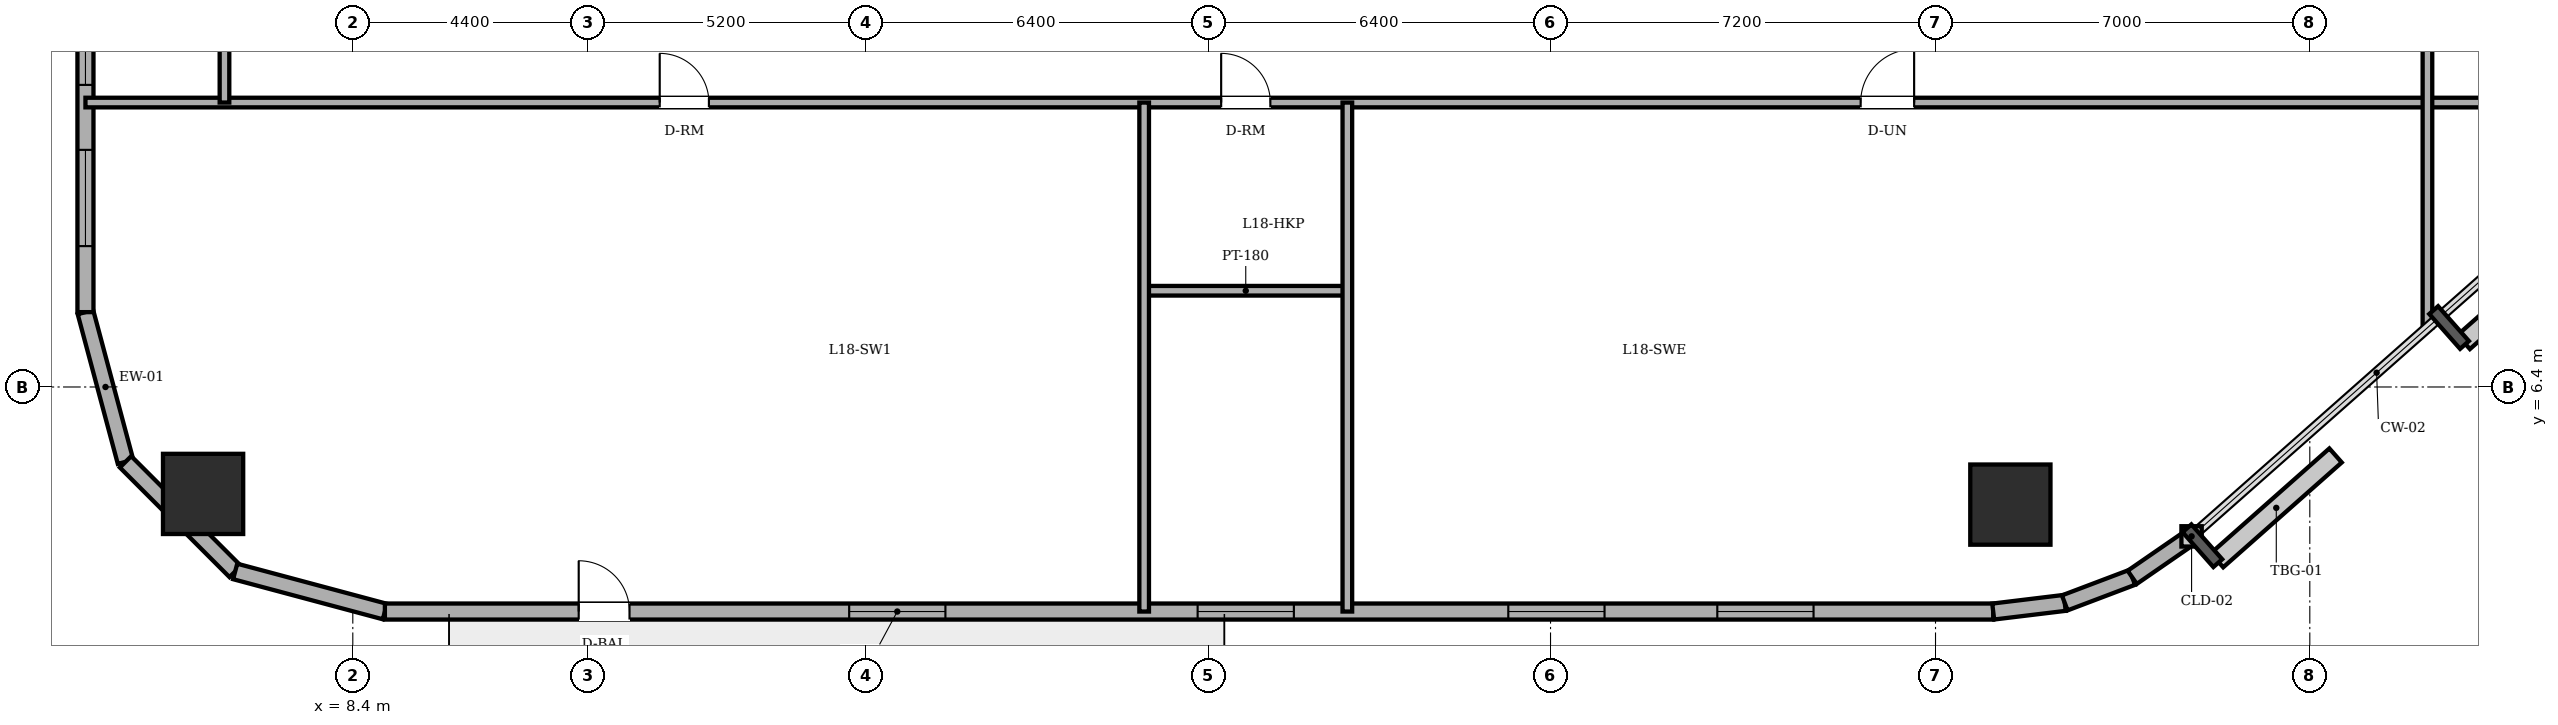
"""IFC4 building model, lengths in metres.
Left out: names, types, materials, properties, quantities, classifications, styles, units other than length and angle.
Written with IfcOpenShell. Run it as: python <this file> out.ifc"""

import sys

from ifc_helpers import new_model, si_unit, direction, frame, frame_2d, origin, origin_2d, place, context, subcontext, project, spatial, rectangle, circle, extrude, element, fill, save


model = new_model("IFC4")
c1 = context("Model", 3, precision=1e-05, world=origin(), true_north=direction((0.0, 1.0)))
c2 = subcontext(c1, "Body", "Model", "MODEL_VIEW")
j1 = project(units=[si_unit("LENGTHUNIT", "METRE"), si_unit("PLANEANGLEUNIT", "RADIAN")], contexts=[c1])
p1 = place(None, origin())
s1 = spatial("IfcSite", under=j1, at=p1, CompositionType="ELEMENT")
p2 = place(p1, origin())
s2 = spatial("IfcBuilding", under=s1, at=p2, CompositionType="ELEMENT")
p3 = place(p2, frame((0.0, 0.0, 68.4)))
s3 = spatial("IfcBuildingStorey", under=s2, at=p3, CompositionType="ELEMENT", Elevation=68.4)
for number, where, z_axis, x_axis in (
    (1, (5.6, 4.4, 0.0), (0.0, 0.0, 1.0), (1.0, 0.0, 0.0)),
    (2, (39.4, 4.2, 0.0), (0.0, 0.0, 1.0), (1.0, 0.0, 0.0)),
):
    element("IfcColumn", number, at=place(p3, frame(where, z_axis=z_axis, x_axis=x_axis)), inside=s3, PredefinedType="COLUMN", context=c2, shape_type="SweptSolid", body=[
        extrude(circle(Radius=0.75, at=origin_2d()), origin(), (0.0, 0.0, 1.0), 3.6),
    ])
p4 = place(p3, frame((3.4, 7.8, 0.0), z_axis=(0.0, 0.0, 1.0), x_axis=(0.258731875344, -0.96594917914, 0.0)))
e3 = element("IfcWall", 3, at=p4, inside=s3, PredefinedType="SOLIDWALL", context=c2, shape_type="SweptSolid", body=[
    extrude(rectangle(XDim=2.899, YDim=0.3, at=frame_2d((1.449, 0.0))), origin(), (0.0, 0.0, 1.0), 3.4),
])
p5 = place(p3, frame((4.15, 5.0, 0.0), z_axis=(0.0, 0.0, 1.0), x_axis=(0.707106781187, -0.707106781187, 0.0)))
e4 = element("IfcWall", 4, at=p5, inside=s3, PredefinedType="SOLIDWALL", context=c2, shape_type="SweptSolid", body=[
    extrude(rectangle(XDim=2.899, YDim=0.3, at=frame_2d((1.45, 0.0))), origin(), (0.0, 0.0, 1.0), 3.4),
])
p6 = place(p3, frame((6.2, 2.95, 0.0), z_axis=(0.0, 0.0, 1.0), x_axis=(0.96594917914, -0.258731875344, 0.0)))
e5 = element("IfcWall", 5, at=p6, inside=s3, PredefinedType="SOLIDWALL", context=c2, shape_type="SweptSolid", body=[
    extrude(rectangle(XDim=2.899, YDim=0.3, at=frame_2d((1.449, 0.0))), origin(), (0.0, 0.0, 1.0), 3.4),
])
p7 = place(p3, frame((9.0, 2.2, 0.0), z_axis=(0.0, 0.0, 1.0), x_axis=(1.0, 0.0, 0.0)))
e6 = element("IfcWall", 6, at=p7, inside=s3, PredefinedType="SOLIDWALL", context=c2, shape_type="SweptSolid", body=[
    extrude(rectangle(XDim=30.079, YDim=0.3, at=frame_2d((15.04, 0.0))), origin(), (0.0, 0.0, 1.0), 3.4),
])
p8 = place(p7, frame((3.625, 0.0, 0.0)))
e7 = element("IfcOpeningElement", 7, at=p8, cuts=e6, PredefinedType="OPENING", context=c2, shape_type="SweptSolid", body=[
    extrude(rectangle(XDim=0.95, YDim=2.2, at=frame_2d((0.475, 1.1))), frame((0.0, 0.16, 0.0), z_axis=(0.0, -1.0, 0.0), x_axis=(1.0, 0.0, 0.0)), (0.0, 0.0, 1.0), 0.32),
])
p9 = place(p7, frame((8.683, 0.0, 0.85)))
e8 = element("IfcOpeningElement", 8, at=p9, cuts=e6, PredefinedType="OPENING", context=c2, shape_type="SweptSolid", body=[
    extrude(rectangle(XDim=1.8, YDim=1.55, at=frame_2d((0.9, 0.775))), frame((0.0, 0.16, 0.0), z_axis=(0.0, -1.0, 0.0), x_axis=(1.0, 0.0, 0.0)), (0.0, 0.0, 1.0), 0.32),
])
p10 = place(p7, frame((15.2, 0.0, 0.85)))
e9 = element("IfcOpeningElement", 9, at=p10, cuts=e6, PredefinedType="OPENING", context=c2, shape_type="SweptSolid", body=[
    extrude(rectangle(XDim=1.8, YDim=1.55, at=frame_2d((0.9, 0.775))), frame((0.0, 0.16, 0.0), z_axis=(0.0, -1.0, 0.0), x_axis=(1.0, 0.0, 0.0)), (0.0, 0.0, 1.0), 0.32),
])
p11 = place(p7, frame((21.01, 0.0, 0.85)))
e10 = element("IfcOpeningElement", 10, at=p11, cuts=e6, PredefinedType="OPENING", context=c2, shape_type="SweptSolid", body=[
    extrude(rectangle(XDim=1.8, YDim=1.55, at=frame_2d((0.9, 0.775))), frame((0.0, 0.16, 0.0), z_axis=(0.0, -1.0, 0.0), x_axis=(1.0, 0.0, 0.0)), (0.0, 0.0, 1.0), 0.32),
])
p12 = place(p7, frame((24.919, 0.0, 0.85)))
e11 = element("IfcOpeningElement", 11, at=p12, cuts=e6, PredefinedType="OPENING", context=c2, shape_type="SweptSolid", body=[
    extrude(rectangle(XDim=1.8, YDim=1.55, at=frame_2d((0.9, 0.775))), frame((0.0, 0.16, 0.0), z_axis=(0.0, -1.0, 0.0), x_axis=(1.0, 0.0, 0.0)), (0.0, 0.0, 1.0), 0.32),
])
p13 = place(p3, frame((39.079, 2.2, 0.0), z_axis=(0.0, 0.0, 1.0), x_axis=(0.992739027259, 0.120288086515, 0.0)))
e12 = element("IfcWall", 12, at=p13, inside=s3, PredefinedType="SOLIDWALL", context=c2, shape_type="SweptSolid", body=[
    extrude(rectangle(XDim=1.348, YDim=0.3, at=frame_2d((0.674, 0.0))), origin(), (0.0, 0.0, 1.0), 3.4),
])
p14 = place(p3, frame((40.417, 2.362, 0.0), z_axis=(0.0, 0.0, 1.0), x_axis=(0.935156721165, 0.354234254216, 0.0)))
e13 = element("IfcWall", 13, at=p14, inside=s3, PredefinedType="SOLIDWALL", context=c2, shape_type="SweptSolid", body=[
    extrude(rectangle(XDim=1.349, YDim=0.3, at=frame_2d((0.675, 0.0))), origin(), (0.0, 0.0, 1.0), 3.4),
])
p15 = place(p3, frame((41.679, 2.84, 0.0), z_axis=(0.0, 0.0, 1.0), x_axis=(0.823116500192, 0.567872544777, 0.0)))
e14 = element("IfcWall", 14, at=p15, inside=s3, PredefinedType="SOLIDWALL", context=c2, shape_type="SweptSolid", body=[
    extrude(rectangle(XDim=1.349, YDim=0.3, at=frame_2d((0.674, 0.0))), origin(), (0.0, 0.0, 1.0), 3.4),
])
p16 = place(p3, frame((3.4, 40.2, 0.0), z_axis=(0.0, 0.0, 1.0), x_axis=(0.0, -1.0, 0.0)))
e15 = element("IfcWall", 15, at=p16, inside=s3, PredefinedType="SOLIDWALL", context=c2, shape_type="SweptSolid", body=[
    extrude(rectangle(XDim=32.4, YDim=0.3, at=frame_2d((16.2, 0.0))), origin(), (0.0, 0.0, 1.0), 3.4),
])
p17 = place(p16, frame((1.235, 0.0, 0.85)))
e16 = element("IfcOpeningElement", 16, at=p17, cuts=e15, PredefinedType="OPENING", context=c2, shape_type="SweptSolid", body=[
    extrude(rectangle(XDim=1.8, YDim=1.55, at=frame_2d((0.9, 0.775))), frame((0.0, 0.16, 0.0), z_axis=(0.0, -1.0, 0.0), x_axis=(1.0, 0.0, 0.0)), (0.0, 0.0, 1.0), 0.32),
])
p18 = place(p16, frame((4.25, 0.0, 0.85)))
e17 = element("IfcOpeningElement", 17, at=p18, cuts=e15, PredefinedType="OPENING", context=c2, shape_type="SweptSolid", body=[
    extrude(rectangle(XDim=1.8, YDim=1.55, at=frame_2d((0.9, 0.775))), frame((0.0, 0.16, 0.0), z_axis=(0.0, -1.0, 0.0), x_axis=(1.0, 0.0, 0.0)), (0.0, 0.0, 1.0), 0.32),
])
p19 = place(p16, frame((9.253, 0.0, 0.85)))
e18 = element("IfcOpeningElement", 18, at=p19, cuts=e15, PredefinedType="OPENING", context=c2, shape_type="SweptSolid", body=[
    extrude(rectangle(XDim=1.8, YDim=1.55, at=frame_2d((0.9, 0.775))), frame((0.0, 0.16, 0.0), z_axis=(0.0, -1.0, 0.0), x_axis=(1.0, 0.0, 0.0)), (0.0, 0.0, 1.0), 0.32),
])
p20 = place(p16, frame((13.027, 0.0, 0.85)))
e19 = element("IfcOpeningElement", 19, at=p20, cuts=e15, PredefinedType="OPENING", context=c2, shape_type="SweptSolid", body=[
    extrude(rectangle(XDim=1.8, YDim=1.55, at=frame_2d((0.9, 0.775))), frame((0.0, 0.16, 0.0), z_axis=(0.0, -1.0, 0.0), x_axis=(1.0, 0.0, 0.0)), (0.0, 0.0, 1.0), 0.32),
])
p21 = place(p16, frame((19.573, 0.0, 0.85)))
e20 = element("IfcOpeningElement", 20, at=p21, cuts=e15, PredefinedType="OPENING", context=c2, shape_type="SweptSolid", body=[
    extrude(rectangle(XDim=1.8, YDim=1.55, at=frame_2d((0.9, 0.775))), frame((0.0, 0.16, 0.0), z_axis=(0.0, -1.0, 0.0), x_axis=(1.0, 0.0, 0.0)), (0.0, 0.0, 1.0), 0.32),
])
p22 = place(p16, frame((22.347, 0.0, 0.85)))
e21 = element("IfcOpeningElement", 21, at=p22, cuts=e15, PredefinedType="OPENING", context=c2, shape_type="SweptSolid", body=[
    extrude(rectangle(XDim=1.8, YDim=1.55, at=frame_2d((0.9, 0.775))), frame((0.0, 0.16, 0.0), z_axis=(0.0, -1.0, 0.0), x_axis=(1.0, 0.0, 0.0)), (0.0, 0.0, 1.0), 0.32),
])
p23 = place(p16, frame((26.35, 0.0, 0.85)))
e22 = element("IfcOpeningElement", 22, at=p23, cuts=e15, PredefinedType="OPENING", context=c2, shape_type="SweptSolid", body=[
    extrude(rectangle(XDim=1.8, YDim=1.55, at=frame_2d((0.9, 0.775))), frame((0.0, 0.16, 0.0), z_axis=(0.0, -1.0, 0.0), x_axis=(1.0, 0.0, 0.0)), (0.0, 0.0, 1.0), 0.32),
])
p24 = place(p16, frame((29.365, 0.0, 0.85)))
e23 = element("IfcOpeningElement", 23, at=p24, cuts=e15, PredefinedType="OPENING", context=c2, shape_type="SweptSolid", body=[
    extrude(rectangle(XDim=1.8, YDim=1.55, at=frame_2d((0.9, 0.775))), frame((0.0, 0.16, 0.0), z_axis=(0.0, -1.0, 0.0), x_axis=(1.0, 0.0, 0.0)), (0.0, 0.0, 1.0), 0.32),
])
p25 = place(p3, frame((23.2, 8.2, 0.0), z_axis=(0.0, 0.0, 1.0), x_axis=(1.0, 0.0, 0.0)))
e24 = element("IfcWall", 24, at=p25, inside=s3, PredefinedType="PARTITIONING", context=c2, shape_type="SweptSolid", body=[
    extrude(rectangle(XDim=3.8, YDim=0.18, at=frame_2d((1.9, 0.0))), origin(), (0.0, 0.0, 1.0), 3.4),
])
p26 = place(p3, frame((3.4, 11.72, 0.0), z_axis=(0.0, 0.0, 1.0), x_axis=(1.0, 0.0, 0.0)))
e25 = element("IfcWall", 25, at=p26, inside=s3, PredefinedType="PARTITIONING", context=c2, shape_type="SweptSolid", body=[
    extrude(rectangle(XDim=47.689, YDim=0.18, at=frame_2d((23.845, 0.0))), origin(), (0.0, 0.0, 1.0), 3.4),
])
p27 = place(p26, frame((21.24, 0.0, 0.0)))
e26 = element("IfcOpeningElement", 26, at=p27, cuts=e25, PredefinedType="OPENING", context=c2, shape_type="SweptSolid", body=[
    extrude(rectangle(XDim=0.92, YDim=2.1, at=frame_2d((0.46, 1.05))), frame((0.0, 0.1, 0.0), z_axis=(0.0, -1.0, 0.0), x_axis=(1.0, 0.0, 0.0)), (0.0, 0.0, 1.0), 0.2),
])
p28 = place(p26, frame((10.74, 0.0, 0.0)))
e27 = element("IfcOpeningElement", 27, at=p28, cuts=e25, PredefinedType="OPENING", context=c2, shape_type="SweptSolid", body=[
    extrude(rectangle(XDim=0.92, YDim=2.1, at=frame_2d((0.46, 1.05))), frame((0.0, 0.1, 0.0), z_axis=(0.0, -1.0, 0.0), x_axis=(1.0, 0.0, 0.0)), (0.0, 0.0, 1.0), 0.2),
])
p29 = place(p26, frame((33.2, 0.0, 0.0)))
e28 = element("IfcOpeningElement", 28, at=p29, cuts=e25, PredefinedType="OPENING", context=c2, shape_type="SweptSolid", body=[
    extrude(rectangle(XDim=1.0, YDim=2.15, at=frame_2d((0.5, 1.075))), frame((0.0, 0.1, 0.0), z_axis=(0.0, -1.0, 0.0), x_axis=(1.0, 0.0, 0.0)), (0.0, 0.0, 1.0), 0.2),
])
p30 = place(p3, frame((6.0, 11.72, 0.0), z_axis=(0.0, 0.0, 1.0), x_axis=(0.0, 1.0, 0.0)))
e29 = element("IfcWall", 29, at=p30, inside=s3, PredefinedType="PARTITIONING", context=c2, shape_type="SweptSolid", body=[
    extrude(rectangle(XDim=2.46, YDim=0.18, at=frame_2d((1.23, 0.0))), origin(), (0.0, 0.0, 1.0), 3.4),
])
for number, where, z_axis, x_axis in (
    (30, (23.2, 2.2, 0.0), (0.0, 0.0, 1.0), (0.0, 1.0, 0.0)),
    (31, (27.0, 2.2, 0.0), (0.0, 0.0, 1.0), (0.0, 1.0, 0.0)),
):
    element("IfcWall", number, at=place(p3, frame(where, z_axis=z_axis, x_axis=x_axis)), inside=s3, PredefinedType="PARTITIONING", context=c2, shape_type="SweptSolid", body=[
        extrude(rectangle(XDim=9.52, YDim=0.18, at=frame_2d((4.76, 0.0))), origin(), (0.0, 0.0, 1.0), 3.4),
    ])
p31 = place(p3, frame((47.2, 7.508, 0.0), z_axis=(0.0, 0.0, 1.0), x_axis=(0.0, 1.0, 0.0)))
e32 = element("IfcWall", 32, at=p31, inside=s3, PredefinedType="PARTITIONING", context=c2, shape_type="SweptSolid", body=[
    extrude(rectangle(XDim=22.842, YDim=0.18, at=frame_2d((11.421, 0.0))), origin(), (0.0, 0.0, 1.0), 3.4),
])
p32 = place(p31, frame((18.447, 0.0, 0.0)))
e33 = element("IfcOpeningElement", 33, at=p32, cuts=e32, PredefinedType="OPENING", context=c2, shape_type="SweptSolid", body=[
    extrude(rectangle(XDim=0.92, YDim=2.1, at=frame_2d((0.46, 1.05))), frame((0.0, 0.1, 0.0), z_axis=(0.0, -1.0, 0.0), x_axis=(1.0, 0.0, 0.0)), (0.0, 0.0, 1.0), 0.2),
])
p33 = place(p31, frame((11.524, 0.0, 0.0)))
e34 = element("IfcOpeningElement", 34, at=p33, cuts=e32, PredefinedType="OPENING", context=c2, shape_type="SweptSolid", body=[
    extrude(rectangle(XDim=0.92, YDim=2.1, at=frame_2d((0.46, 1.05))), frame((0.0, 0.1, 0.0), z_axis=(0.0, -1.0, 0.0), x_axis=(1.0, 0.0, 0.0)), (0.0, 0.0, 1.0), 0.2),
])
p34 = place(p8, origin())
e35 = element("IfcDoor", 35, at=p34, inside=s3, OperationType="SINGLE_SWING_LEFT", PredefinedType="DOOR", context=c2, shape_type="SweptSolid", body=[
    extrude(rectangle(XDim=0.95, YDim=2.2, at=frame_2d((0.475, 1.1))), frame((0.0, 0.025, 0.0), z_axis=(0.0, -1.0, 0.0), x_axis=(1.0, 0.0, 0.0)), (0.0, 0.0, 1.0), 0.05),
])
fill(e7, e35)
p35 = place(p9, origin())
e36 = element("IfcWindow", 36, at=p35, inside=s3, PartitioningType="DOUBLE_PANEL_VERTICAL", PredefinedType="WINDOW", context=c2, shape_type="SweptSolid", body=[
    extrude(rectangle(XDim=1.8, YDim=1.55, at=frame_2d((0.9, 0.775))), frame((0.0, 0.03, 0.0), z_axis=(0.0, -1.0, 0.0), x_axis=(1.0, 0.0, 0.0)), (0.0, 0.0, 1.0), 0.06),
])
fill(e8, e36)
p36 = place(p10, origin())
e37 = element("IfcWindow", 37, at=p36, inside=s3, PartitioningType="DOUBLE_PANEL_VERTICAL", PredefinedType="WINDOW", context=c2, shape_type="SweptSolid", body=[
    extrude(rectangle(XDim=1.8, YDim=1.55, at=frame_2d((0.9, 0.775))), frame((0.0, 0.03, 0.0), z_axis=(0.0, -1.0, 0.0), x_axis=(1.0, 0.0, 0.0)), (0.0, 0.0, 1.0), 0.06),
])
fill(e9, e37)
p37 = place(p11, origin())
e38 = element("IfcWindow", 38, at=p37, inside=s3, PartitioningType="DOUBLE_PANEL_VERTICAL", PredefinedType="WINDOW", context=c2, shape_type="SweptSolid", body=[
    extrude(rectangle(XDim=1.8, YDim=1.55, at=frame_2d((0.9, 0.775))), frame((0.0, 0.03, 0.0), z_axis=(0.0, -1.0, 0.0), x_axis=(1.0, 0.0, 0.0)), (0.0, 0.0, 1.0), 0.06),
])
fill(e10, e38)
p38 = place(p12, origin())
e39 = element("IfcWindow", 39, at=p38, inside=s3, PartitioningType="DOUBLE_PANEL_VERTICAL", PredefinedType="WINDOW", context=c2, shape_type="SweptSolid", body=[
    extrude(rectangle(XDim=1.8, YDim=1.55, at=frame_2d((0.9, 0.775))), frame((0.0, 0.03, 0.0), z_axis=(0.0, -1.0, 0.0), x_axis=(1.0, 0.0, 0.0)), (0.0, 0.0, 1.0), 0.06),
])
fill(e11, e39)
p39 = place(p23, origin())
e40 = element("IfcWindow", 40, at=p39, inside=s3, PartitioningType="DOUBLE_PANEL_VERTICAL", PredefinedType="WINDOW", context=c2, shape_type="SweptSolid", body=[
    extrude(rectangle(XDim=1.8, YDim=1.55, at=frame_2d((0.9, 0.775))), frame((0.0, 0.03, 0.0), z_axis=(0.0, -1.0, 0.0), x_axis=(1.0, 0.0, 0.0)), (0.0, 0.0, 1.0), 0.06),
])
fill(e22, e40)
p40 = place(p24, origin())
e41 = element("IfcWindow", 41, at=p40, inside=s3, PartitioningType="DOUBLE_PANEL_VERTICAL", PredefinedType="WINDOW", context=c2, shape_type="SweptSolid", body=[
    extrude(rectangle(XDim=1.8, YDim=1.55, at=frame_2d((0.9, 0.775))), frame((0.0, 0.03, 0.0), z_axis=(0.0, -1.0, 0.0), x_axis=(1.0, 0.0, 0.0)), (0.0, 0.0, 1.0), 0.06),
])
fill(e23, e41)
p41 = place(p27, origin())
e42 = element("IfcDoor", 42, at=p41, inside=s3, OperationType="SINGLE_SWING_LEFT", PredefinedType="DOOR", context=c2, shape_type="SweptSolid", body=[
    extrude(rectangle(XDim=0.92, YDim=2.1, at=frame_2d((0.46, 1.05))), frame((0.0, 0.025, 0.0), z_axis=(0.0, -1.0, 0.0), x_axis=(1.0, 0.0, 0.0)), (0.0, 0.0, 1.0), 0.05),
])
fill(e26, e42)
p42 = place(p28, origin())
e43 = element("IfcDoor", 43, at=p42, inside=s3, OperationType="SINGLE_SWING_LEFT", PredefinedType="DOOR", context=c2, shape_type="SweptSolid", body=[
    extrude(rectangle(XDim=0.92, YDim=2.1, at=frame_2d((0.46, 1.05))), frame((0.0, 0.025, 0.0), z_axis=(0.0, -1.0, 0.0), x_axis=(1.0, 0.0, 0.0)), (0.0, 0.0, 1.0), 0.05),
])
fill(e27, e43)
p43 = place(p29, origin())
e44 = element("IfcDoor", 44, at=p43, inside=s3, OperationType="SINGLE_SWING_RIGHT", PredefinedType="DOOR", context=c2, shape_type="SweptSolid", body=[
    extrude(rectangle(XDim=1.0, YDim=2.15, at=frame_2d((0.5, 1.075))), frame((0.0, 0.025, 0.0), z_axis=(0.0, -1.0, 0.0), x_axis=(1.0, 0.0, 0.0)), (0.0, 0.0, 1.0), 0.05),
])
fill(e28, e44)
save(model, sys.argv[1])
